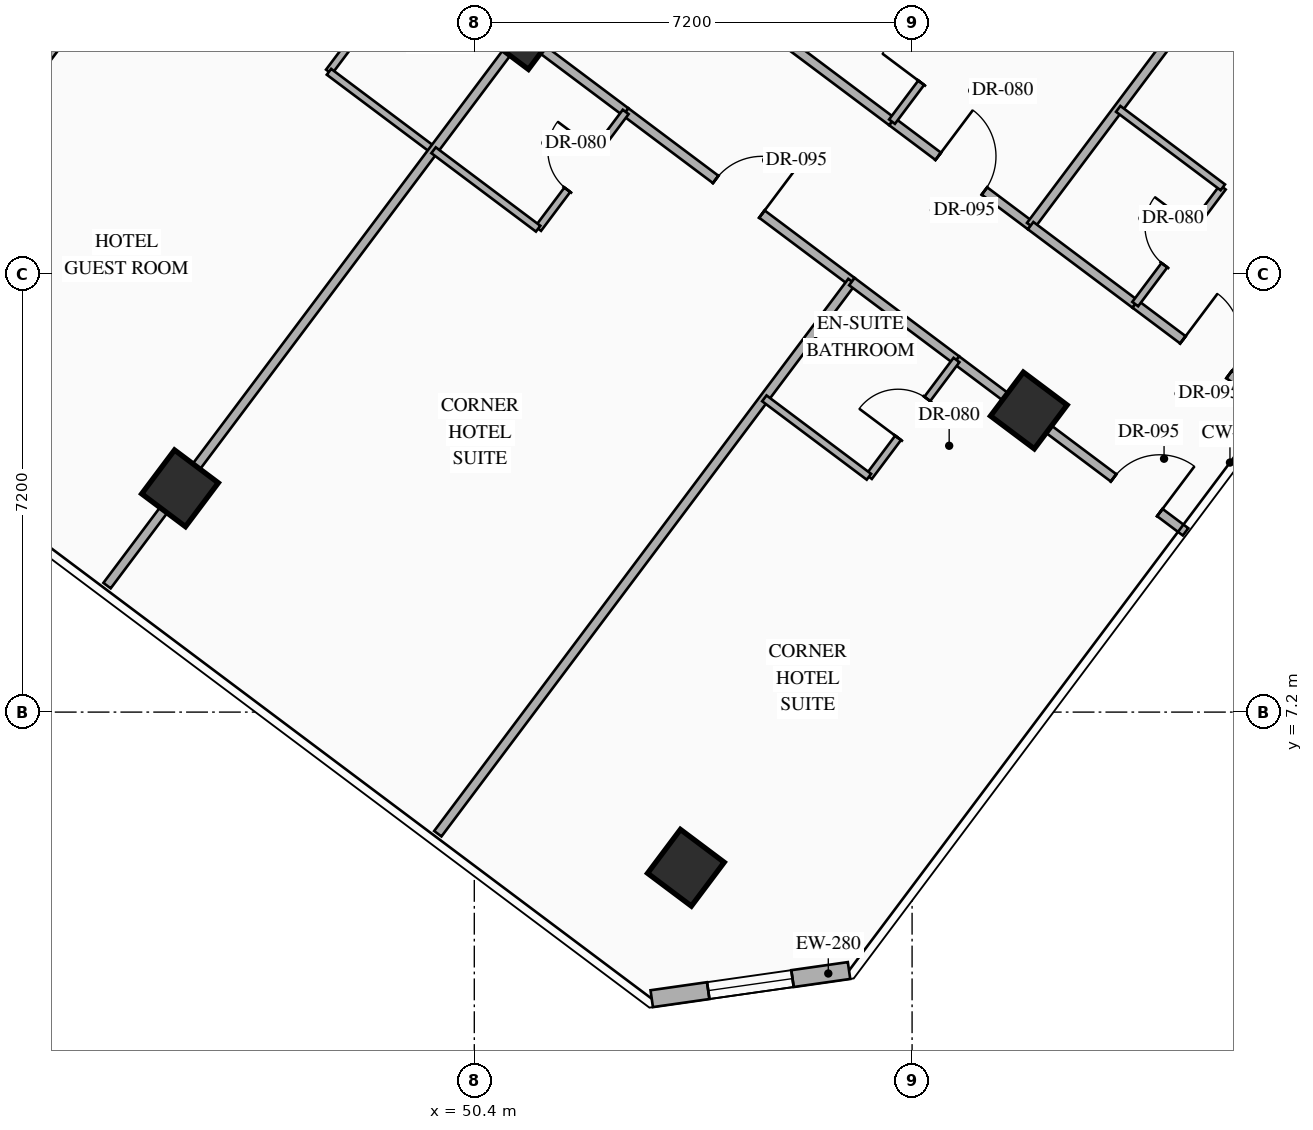
"""IFC4 building model, lengths in metres.
Left out: names, types, materials, properties, quantities, classifications, styles, units other than length and angle.
Written with IfcOpenShell. Run it as: python <this file> out.ifc"""

import sys

from ifc_helpers import new_model, si_unit, direction, frame, frame_2d, origin, origin_2d, place, context, subcontext, project, spatial, rectangle, hollow_rectangle, extrude, element, fill, save


model = new_model("IFC4")
c1 = context("Model", 3, precision=1e-05, world=origin(), true_north=direction((0.0, 1.0)))
c2 = subcontext(c1, "Body", "Model", "MODEL_VIEW")
j1 = project(units=[si_unit("LENGTHUNIT", "METRE"), si_unit("PLANEANGLEUNIT", "RADIAN")], contexts=[c1])
p1 = place(None, origin())
s1 = spatial("IfcSite", under=j1, at=p1, CompositionType="ELEMENT")
p2 = place(p1, origin())
s2 = spatial("IfcBuilding", under=s1, at=p2, CompositionType="ELEMENT")
p3 = place(p2, frame((0.0, 0.0, 88.0)))
s3 = spatial("IfcBuildingStorey", under=s2, at=p3, CompositionType="ELEMENT", Elevation=88.0)
for number, where, z_axis, x_axis in (
    (1, (45.56, 10.88, 0.0), (0.0, 0.0, 1.0), (0.8, -0.6, 0.0)),
    (2, (51.2, 18.4, 0.0), (0.0, 0.0, 1.0), (0.8, -0.6, 0.0)),
    (3, (53.88, 4.64, 0.0), (0.0, 0.0, 1.0), (0.8, -0.6, 0.0)),
    (4, (59.52, 12.16, 0.0), (0.0, 0.0, 1.0), (0.8, -0.6, 0.0)),
):
    element("IfcColumn", number, at=place(p3, frame(where, z_axis=z_axis, x_axis=x_axis)), inside=s3, PredefinedType="COLUMN", context=c2, shape_type="SweptSolid", body=[
        extrude(hollow_rectangle(XDim=0.9, YDim=0.9, WallThickness=0.036, at=origin_2d()), origin(), (0.0, 0.0, 1.0), 3.35),
    ])
p4 = place(p3, frame((56.563, 2.95, 0.0), z_axis=(0.0, 0.0, 1.0), x_axis=(-0.989977778067, -0.141223223777, 0.0)))
e5 = element("IfcWall", 5, at=p4, inside=s3, PredefinedType="STANDARD", context=c2, shape_type="SweptSolid", body=[
    extrude(rectangle(XDim=3.278, YDim=0.28, at=frame_2d((1.639, 0.0))), origin(), (0.0, 0.0, 1.0), 3.05),
])
p5 = place(p4, frame((0.939, 0.0, 0.85)))
e6 = element("IfcOpeningElement", 6, at=p5, cuts=e5, PredefinedType="OPENING", context=c2, shape_type="SweptSolid", body=[
    extrude(rectangle(XDim=1.4, YDim=1.8, at=frame_2d((0.7, 0.9))), frame((0.0, 0.15, 0.0), z_axis=(0.0, -1.0, 0.0), x_axis=(1.0, 0.0, 0.0)), (0.0, 0.0, 1.0), 0.3),
])
p6 = place(p3, frame((39.464, 12.752, 0.0), z_axis=(0.0, 0.0, 1.0), x_axis=(0.6, 0.8, 0.0)))
e7 = element("IfcWall", 7, at=p6, inside=s3, PredefinedType="PARTITIONING", context=c2, shape_type="SweptSolid", body=[
    extrude(rectangle(XDim=11.51, YDim=0.15, at=frame_2d((5.755, 0.0))), origin(), (0.0, 0.0, 1.0), 3.05),
])
p7 = place(p3, frame((55.55, 18.2, 0.0), z_axis=(0.0, 0.0, 1.0), x_axis=(0.79998637334, -0.60001816845, 0.0)))
e8 = element("IfcWall", 8, at=p7, inside=s3, PredefinedType="PARTITIONING", context=c2, shape_type="SweptSolid", body=[
    extrude(rectangle(XDim=2.15, YDim=0.15, at=frame_2d((1.075, 0.0))), origin(), (0.0, 0.0, 1.0), 2.695),
])
p8 = place(p3, frame((57.27, 16.91, 0.0), z_axis=(0.0, 0.0, 1.0), x_axis=(0.800010279488, -0.599986293772, 0.0)))
e9 = element("IfcWall", 9, at=p8, inside=s3, PredefinedType="PARTITIONING", context=c2, shape_type="SweptSolid", body=[
    extrude(rectangle(XDim=2.85, YDim=0.15, at=frame_2d((1.425, 0.0))), origin(), (0.0, 0.0, 1.0), 2.695),
])
p9 = place(p8, frame((0.95, 0.0, 0.0)))
e10 = element("IfcOpeningElement", 10, at=p9, cuts=e9, PredefinedType="OPENING", context=c2, shape_type="SweptSolid", body=[
    extrude(rectangle(XDim=0.95, YDim=2.15, at=frame_2d((0.475, 1.075))), frame((0.0, 0.085, 0.0), z_axis=(0.0, -1.0, 0.0), x_axis=(1.0, 0.0, 0.0)), (0.0, 0.0, 1.0), 0.17),
])
p10 = place(p3, frame((57.27, 16.91, 0.0), z_axis=(0.0, 0.0, 1.0), x_axis=(0.599951172744, 0.800036618114, 0.0)))
e11 = element("IfcWall", 11, at=p10, inside=s3, PredefinedType="PARTITIONING", context=c2, shape_type="SweptSolid", body=[
    extrude(rectangle(XDim=2.4, YDim=0.12, at=frame_2d((1.2, 0.0))), origin(), (0.0, 0.0, 1.0), 3.05),
])
p11 = place(p10, frame((0.8, 0.0, 0.0)))
e12 = element("IfcOpeningElement", 12, at=p11, cuts=e11, PredefinedType="OPENING", context=c2, shape_type="SweptSolid", body=[
    extrude(rectangle(XDim=0.8, YDim=2.06, at=frame_2d((0.4, 1.03))), frame((0.0, 0.07, 0.0), z_axis=(0.0, -1.0, 0.0), x_axis=(1.0, 0.0, 0.0)), (0.0, 0.0, 1.0), 0.14),
])
p12 = place(p3, frame((59.55, 15.2, 0.0), z_axis=(0.0, 0.0, 1.0), x_axis=(0.599996617946, 0.80000253653, 0.0)))
e13 = element("IfcWall", 13, at=p12, inside=s3, PredefinedType="PARTITIONING", context=c2, shape_type="SweptSolid", body=[
    extrude(rectangle(XDim=11.55, YDim=0.15, at=frame_2d((5.775, 0.0))), origin(), (0.0, 0.0, 1.0), 3.05),
])
p13 = place(p3, frame((59.55, 15.2, 0.0), z_axis=(0.0, 0.0, 1.0), x_axis=(0.79998637334, -0.60001816845, 0.0)))
e14 = element("IfcWall", 14, at=p13, inside=s3, PredefinedType="PARTITIONING", context=c2, shape_type="SweptSolid", body=[
    extrude(rectangle(XDim=2.15, YDim=0.15, at=frame_2d((1.075, 0.0))), origin(), (0.0, 0.0, 1.0), 2.695),
])
p14 = place(p3, frame((61.27, 13.91, 0.0), z_axis=(0.0, 0.0, 1.0), x_axis=(0.800010068184, -0.59998657552, 0.0)))
e15 = element("IfcWall", 15, at=p14, inside=s3, PredefinedType="PARTITIONING", context=c2, shape_type="SweptSolid", body=[
    extrude(rectangle(XDim=2.91, YDim=0.15, at=frame_2d((1.455, 0.0))), origin(), (0.0, 0.0, 1.0), 3.05),
])
p15 = place(p14, frame((0.98, 0.0, 0.0)))
e16 = element("IfcOpeningElement", 16, at=p15, cuts=e15, PredefinedType="OPENING", context=c2, shape_type="SweptSolid", body=[
    extrude(rectangle(XDim=0.95, YDim=2.15, at=frame_2d((0.475, 1.075))), frame((0.0, 0.085, 0.0), z_axis=(0.0, -1.0, 0.0), x_axis=(1.0, 0.0, 0.0)), (0.0, 0.0, 1.0), 0.17),
])
p16 = place(p3, frame((61.27, 13.91, 0.0), z_axis=(0.0, 0.0, 1.0), x_axis=(0.599951172744, 0.800036618114, 0.0)))
e17 = element("IfcWall", 17, at=p16, inside=s3, PredefinedType="PARTITIONING", context=c2, shape_type="SweptSolid", body=[
    extrude(rectangle(XDim=2.4, YDim=0.12, at=frame_2d((1.2, 0.0))), origin(), (0.0, 0.0, 1.0), 3.05),
])
p17 = place(p16, frame((0.8, 0.0, 0.0)))
e18 = element("IfcOpeningElement", 18, at=p17, cuts=e17, PredefinedType="OPENING", context=c2, shape_type="SweptSolid", body=[
    extrude(rectangle(XDim=0.8, YDim=2.06, at=frame_2d((0.4, 1.03))), frame((0.0, 0.07, 0.0), z_axis=(0.0, -1.0, 0.0), x_axis=(1.0, 0.0, 0.0)), (0.0, 0.0, 1.0), 0.14),
])
p18 = place(p3, frame((60.99, 17.12, 0.0), z_axis=(0.0, 0.0, 1.0), x_axis=(0.79998637334, -0.60001816845, 0.0)))
e19 = element("IfcWall", 19, at=p18, inside=s3, PredefinedType="PARTITIONING", context=c2, shape_type="SweptSolid", body=[
    extrude(rectangle(XDim=2.15, YDim=0.12, at=frame_2d((1.075, 0.0))), origin(), (0.0, 0.0, 1.0), 3.05),
])
p19 = place(p3, frame((48.01, 17.73, 0.0), z_axis=(0.0, 0.0, 1.0), x_axis=(0.6, 0.8, 0.0)))
e20 = element("IfcWall", 20, at=p19, inside=s3, PredefinedType="PARTITIONING", context=c2, shape_type="SweptSolid", body=[
    extrude(rectangle(XDim=2.4, YDim=0.12, at=frame_2d((1.2, 0.0))), origin(), (0.0, 0.0, 1.0), 3.05),
])
p20 = place(p19, frame((0.8, 0.0, 0.0)))
e21 = element("IfcOpeningElement", 21, at=p20, cuts=e20, PredefinedType="OPENING", context=c2, shape_type="SweptSolid", body=[
    extrude(rectangle(XDim=0.8, YDim=2.06, at=frame_2d((0.4, 1.03))), frame((0.0, 0.07, 0.0), z_axis=(0.0, -1.0, 0.0), x_axis=(1.0, 0.0, 0.0)), (0.0, 0.0, 1.0), 0.14),
])
p21 = place(p3, frame((48.01, 17.73, 0.0), z_axis=(0.0, 0.0, 1.0), x_axis=(0.79998637334, -0.60001816845, 0.0)))
e22 = element("IfcWall", 22, at=p21, inside=s3, PredefinedType="PARTITIONING", context=c2, shape_type="SweptSolid", body=[
    extrude(rectangle(XDim=2.15, YDim=0.12, at=frame_2d((1.075, 0.0))), origin(), (0.0, 0.0, 1.0), 3.05),
])
p22 = place(p3, frame((44.36, 9.28, 0.0), z_axis=(0.0, 0.0, 1.0), x_axis=(0.599986233332, 0.800010324816, 0.0)))
e23 = element("IfcWall", 23, at=p22, inside=s3, PredefinedType="PARTITIONING", context=c2, shape_type="SweptSolid", body=[
    extrude(rectangle(XDim=11.35, YDim=0.15, at=frame_2d((5.675, 0.0))), origin(), (0.0, 0.0, 1.0), 2.345),
])
p23 = place(p3, frame((51.17, 18.36, 0.0), z_axis=(0.0, 0.0, 1.0), x_axis=(0.79998637334, -0.60001816845, 0.0)))
e24 = element("IfcWall", 24, at=p23, inside=s3, PredefinedType="PARTITIONING", context=c2, shape_type="SweptSolid", body=[
    extrude(rectangle(XDim=2.15, YDim=0.15, at=frame_2d((1.075, 0.0))), origin(), (0.0, 0.0, 1.0), 2.345),
])
p24 = place(p3, frame((52.89, 17.07, 0.0), z_axis=(0.0, 0.0, 1.0), x_axis=(0.800012600101, -0.599983199498, 0.0)))
e25 = element("IfcWall", 25, at=p24, inside=s3, PredefinedType="PARTITIONING", context=c2, shape_type="SweptSolid", body=[
    extrude(rectangle(XDim=4.65, YDim=0.15, at=frame_2d((2.325, 0.0))), origin(), (0.0, 0.0, 1.0), 2.345),
])
p25 = place(p24, frame((1.85, 0.0, 0.0)))
e26 = element("IfcOpeningElement", 26, at=p25, cuts=e25, PredefinedType="OPENING", context=c2, shape_type="SweptSolid", body=[
    extrude(rectangle(XDim=0.95, YDim=2.15, at=frame_2d((0.475, 1.075))), frame((0.0, 0.085, 0.0), z_axis=(0.0, -1.0, 0.0), x_axis=(1.0, 0.0, 0.0)), (0.0, 0.0, 1.0), 0.17),
])
p26 = place(p3, frame((51.45, 15.15, 0.0), z_axis=(0.0, 0.0, 1.0), x_axis=(0.599951172744, 0.800036618114, 0.0)))
e27 = element("IfcWall", 27, at=p26, inside=s3, PredefinedType="PARTITIONING", context=c2, shape_type="SweptSolid", body=[
    extrude(rectangle(XDim=2.4, YDim=0.12, at=frame_2d((1.2, 0.0))), origin(), (0.0, 0.0, 1.0), 3.05),
])
p27 = place(p26, frame((0.8, 0.0, 0.0)))
e28 = element("IfcOpeningElement", 28, at=p27, cuts=e27, PredefinedType="OPENING", context=c2, shape_type="SweptSolid", body=[
    extrude(rectangle(XDim=0.8, YDim=2.06, at=frame_2d((0.4, 1.03))), frame((0.0, 0.07, 0.0), z_axis=(0.0, -1.0, 0.0), x_axis=(1.0, 0.0, 0.0)), (0.0, 0.0, 1.0), 0.14),
])
p28 = place(p3, frame((49.73, 16.44, 0.0), z_axis=(0.0, 0.0, 1.0), x_axis=(0.79998637334, -0.60001816845, 0.0)))
e29 = element("IfcWall", 29, at=p28, inside=s3, PredefinedType="PARTITIONING", context=c2, shape_type="SweptSolid", body=[
    extrude(rectangle(XDim=2.15, YDim=0.12, at=frame_2d((1.075, 0.0))), origin(), (0.0, 0.0, 1.0), 3.05),
])
p29 = place(p3, frame((49.8, 5.2, 0.0), z_axis=(0.0, 0.0, 1.0), x_axis=(0.6, 0.8, 0.0)))
e30 = element("IfcWall", 30, at=p29, inside=s3, PredefinedType="PARTITIONING", context=c2, shape_type="SweptSolid", body=[
    extrude(rectangle(XDim=11.35, YDim=0.15, at=frame_2d((5.675, 0.0))), origin(), (0.0, 0.0, 1.0), 3.05),
])
p30 = place(p3, frame((56.61, 14.28, 0.0), z_axis=(0.0, 0.0, 1.0), x_axis=(0.79998637334, -0.60001816845, 0.0)))
e31 = element("IfcWall", 31, at=p30, inside=s3, PredefinedType="PARTITIONING", context=c2, shape_type="SweptSolid", body=[
    extrude(rectangle(XDim=2.15, YDim=0.15, at=frame_2d((1.075, 0.0))), origin(), (0.0, 0.0, 1.0), 2.345),
])
p31 = place(p3, frame((58.33, 12.99, 0.0), z_axis=(0.0, 0.0, 1.0), x_axis=(0.799993779569, -0.600008293819, 0.0)))
e32 = element("IfcWall", 32, at=p31, inside=s3, PredefinedType="PARTITIONING", context=c2, shape_type="SweptSolid", body=[
    extrude(rectangle(XDim=4.71, YDim=0.15, at=frame_2d((2.355, 0.0))), origin(), (0.0, 0.0, 1.0), 2.345),
])
p32 = place(p31, frame((3.23, 0.0, 0.0)))
e33 = element("IfcOpeningElement", 33, at=p32, cuts=e32, PredefinedType="OPENING", context=c2, shape_type="SweptSolid", body=[
    extrude(rectangle(XDim=0.95, YDim=2.15, at=frame_2d((0.475, 1.075))), frame((0.0, 0.085, 0.0), z_axis=(0.0, -1.0, 0.0), x_axis=(1.0, 0.0, 0.0)), (0.0, 0.0, 1.0), 0.17),
])
p33 = place(p3, frame((56.89, 11.07, 0.0), z_axis=(0.0, 0.0, 1.0), x_axis=(0.600065100855, 0.79995117022, 0.0)))
e34 = element("IfcWall", 34, at=p33, inside=s3, PredefinedType="PARTITIONING", context=c2, shape_type="SweptSolid", body=[
    extrude(rectangle(XDim=2.4, YDim=0.12, at=frame_2d((1.2, 0.0))), origin(), (0.0, 0.0, 1.0), 3.05),
])
p34 = place(p33, frame((0.8, 0.0, 0.0)))
e35 = element("IfcOpeningElement", 35, at=p34, cuts=e34, PredefinedType="OPENING", context=c2, shape_type="SweptSolid", body=[
    extrude(rectangle(XDim=0.8, YDim=2.06, at=frame_2d((0.4, 1.03))), frame((0.0, 0.07, 0.0), z_axis=(0.0, -1.0, 0.0), x_axis=(1.0, 0.0, 0.0)), (0.0, 0.0, 1.0), 0.14),
])
p35 = place(p3, frame((55.17, 12.36, 0.0), z_axis=(0.0, 0.0, 1.0), x_axis=(0.79998637334, -0.60001816845, 0.0)))
e36 = element("IfcWall", 36, at=p35, inside=s3, PredefinedType="PARTITIONING", context=c2, shape_type="SweptSolid", body=[
    extrude(rectangle(XDim=2.15, YDim=0.12, at=frame_2d((1.075, 0.0))), origin(), (0.0, 0.0, 1.0), 3.05),
])
p36 = place(p5, origin())
e37 = element("IfcWindow", 37, at=p36, inside=s3, PartitioningType="SINGLE_PANEL", PredefinedType="WINDOW", context=c2, shape_type="SweptSolid", body=[
    extrude(rectangle(XDim=1.4, YDim=1.8, at=frame_2d((0.7, 0.9))), frame((0.0, 0.03, 0.0), z_axis=(0.0, -1.0, 0.0), x_axis=(1.0, 0.0, 0.0)), (0.0, 0.0, 1.0), 0.06),
])
fill(e6, e37)
p37 = place(p9, origin())
e38 = element("IfcDoor", 38, at=p37, inside=s3, OperationType="SINGLE_SWING_LEFT", PredefinedType="DOOR", context=c2, shape_type="SweptSolid", body=[
    extrude(rectangle(XDim=0.95, YDim=2.15, at=frame_2d((0.475, 1.075))), frame((0.0, 0.025, 0.0), z_axis=(0.0, -1.0, 0.0), x_axis=(1.0, 0.0, 0.0)), (0.0, 0.0, 1.0), 0.05),
])
fill(e10, e38)
p38 = place(p11, origin())
e39 = element("IfcDoor", 39, at=p38, inside=s3, OperationType="SINGLE_SWING_LEFT", PredefinedType="DOOR", context=c2, shape_type="SweptSolid", body=[
    extrude(rectangle(XDim=0.8, YDim=2.06, at=frame_2d((0.4, 1.03))), frame((0.0, 0.025, 0.0), z_axis=(0.0, -1.0, 0.0), x_axis=(1.0, 0.0, 0.0)), (0.0, 0.0, 1.0), 0.05),
])
fill(e12, e39)
p39 = place(p15, origin())
e40 = element("IfcDoor", 40, at=p39, inside=s3, OperationType="SINGLE_SWING_LEFT", PredefinedType="DOOR", context=c2, shape_type="SweptSolid", body=[
    extrude(rectangle(XDim=0.95, YDim=2.15, at=frame_2d((0.475, 1.075))), frame((0.0, 0.025, 0.0), z_axis=(0.0, -1.0, 0.0), x_axis=(1.0, 0.0, 0.0)), (0.0, 0.0, 1.0), 0.05),
])
fill(e16, e40)
p40 = place(p17, origin())
e41 = element("IfcDoor", 41, at=p40, inside=s3, OperationType="SINGLE_SWING_RIGHT", PredefinedType="DOOR", context=c2, shape_type="SweptSolid", body=[
    extrude(rectangle(XDim=0.8, YDim=2.06, at=frame_2d((0.4, 1.03))), frame((0.0, 0.025, 0.0), z_axis=(0.0, -1.0, 0.0), x_axis=(1.0, 0.0, 0.0)), (0.0, 0.0, 1.0), 0.05),
])
fill(e18, e41)
p41 = place(p25, origin())
e42 = element("IfcDoor", 42, at=p41, inside=s3, OperationType="SINGLE_SWING_RIGHT", PredefinedType="DOOR", context=c2, shape_type="SweptSolid", body=[
    extrude(rectangle(XDim=0.95, YDim=2.15, at=frame_2d((0.475, 1.075))), frame((0.0, 0.025, 0.0), z_axis=(0.0, -1.0, 0.0), x_axis=(1.0, 0.0, 0.0)), (0.0, 0.0, 1.0), 0.05),
])
fill(e26, e42)
p42 = place(p27, origin())
e43 = element("IfcDoor", 43, at=p42, inside=s3, OperationType="SINGLE_SWING_RIGHT", PredefinedType="DOOR", context=c2, shape_type="SweptSolid", body=[
    extrude(rectangle(XDim=0.8, YDim=2.06, at=frame_2d((0.4, 1.03))), frame((0.0, 0.025, 0.0), z_axis=(0.0, -1.0, 0.0), x_axis=(1.0, 0.0, 0.0)), (0.0, 0.0, 1.0), 0.05),
])
fill(e28, e43)
p43 = place(p32, origin())
e44 = element("IfcDoor", 44, at=p43, inside=s3, OperationType="SINGLE_SWING_RIGHT", PredefinedType="DOOR", context=c2, shape_type="SweptSolid", body=[
    extrude(rectangle(XDim=0.95, YDim=2.15, at=frame_2d((0.475, 1.075))), frame((0.0, 0.025, 0.0), z_axis=(0.0, -1.0, 0.0), x_axis=(1.0, 0.0, 0.0)), (0.0, 0.0, 1.0), 0.05),
])
fill(e33, e44)
p44 = place(p34, origin())
e45 = element("IfcDoor", 45, at=p44, inside=s3, OperationType="SINGLE_SWING_LEFT", PredefinedType="DOOR", context=c2, shape_type="SweptSolid", body=[
    extrude(rectangle(XDim=0.8, YDim=2.06, at=frame_2d((0.4, 1.03))), frame((0.0, 0.025, 0.0), z_axis=(0.0, -1.0, 0.0), x_axis=(1.0, 0.0, 0.0)), (0.0, 0.0, 1.0), 0.05),
])
fill(e35, e45)
save(model, sys.argv[1])
